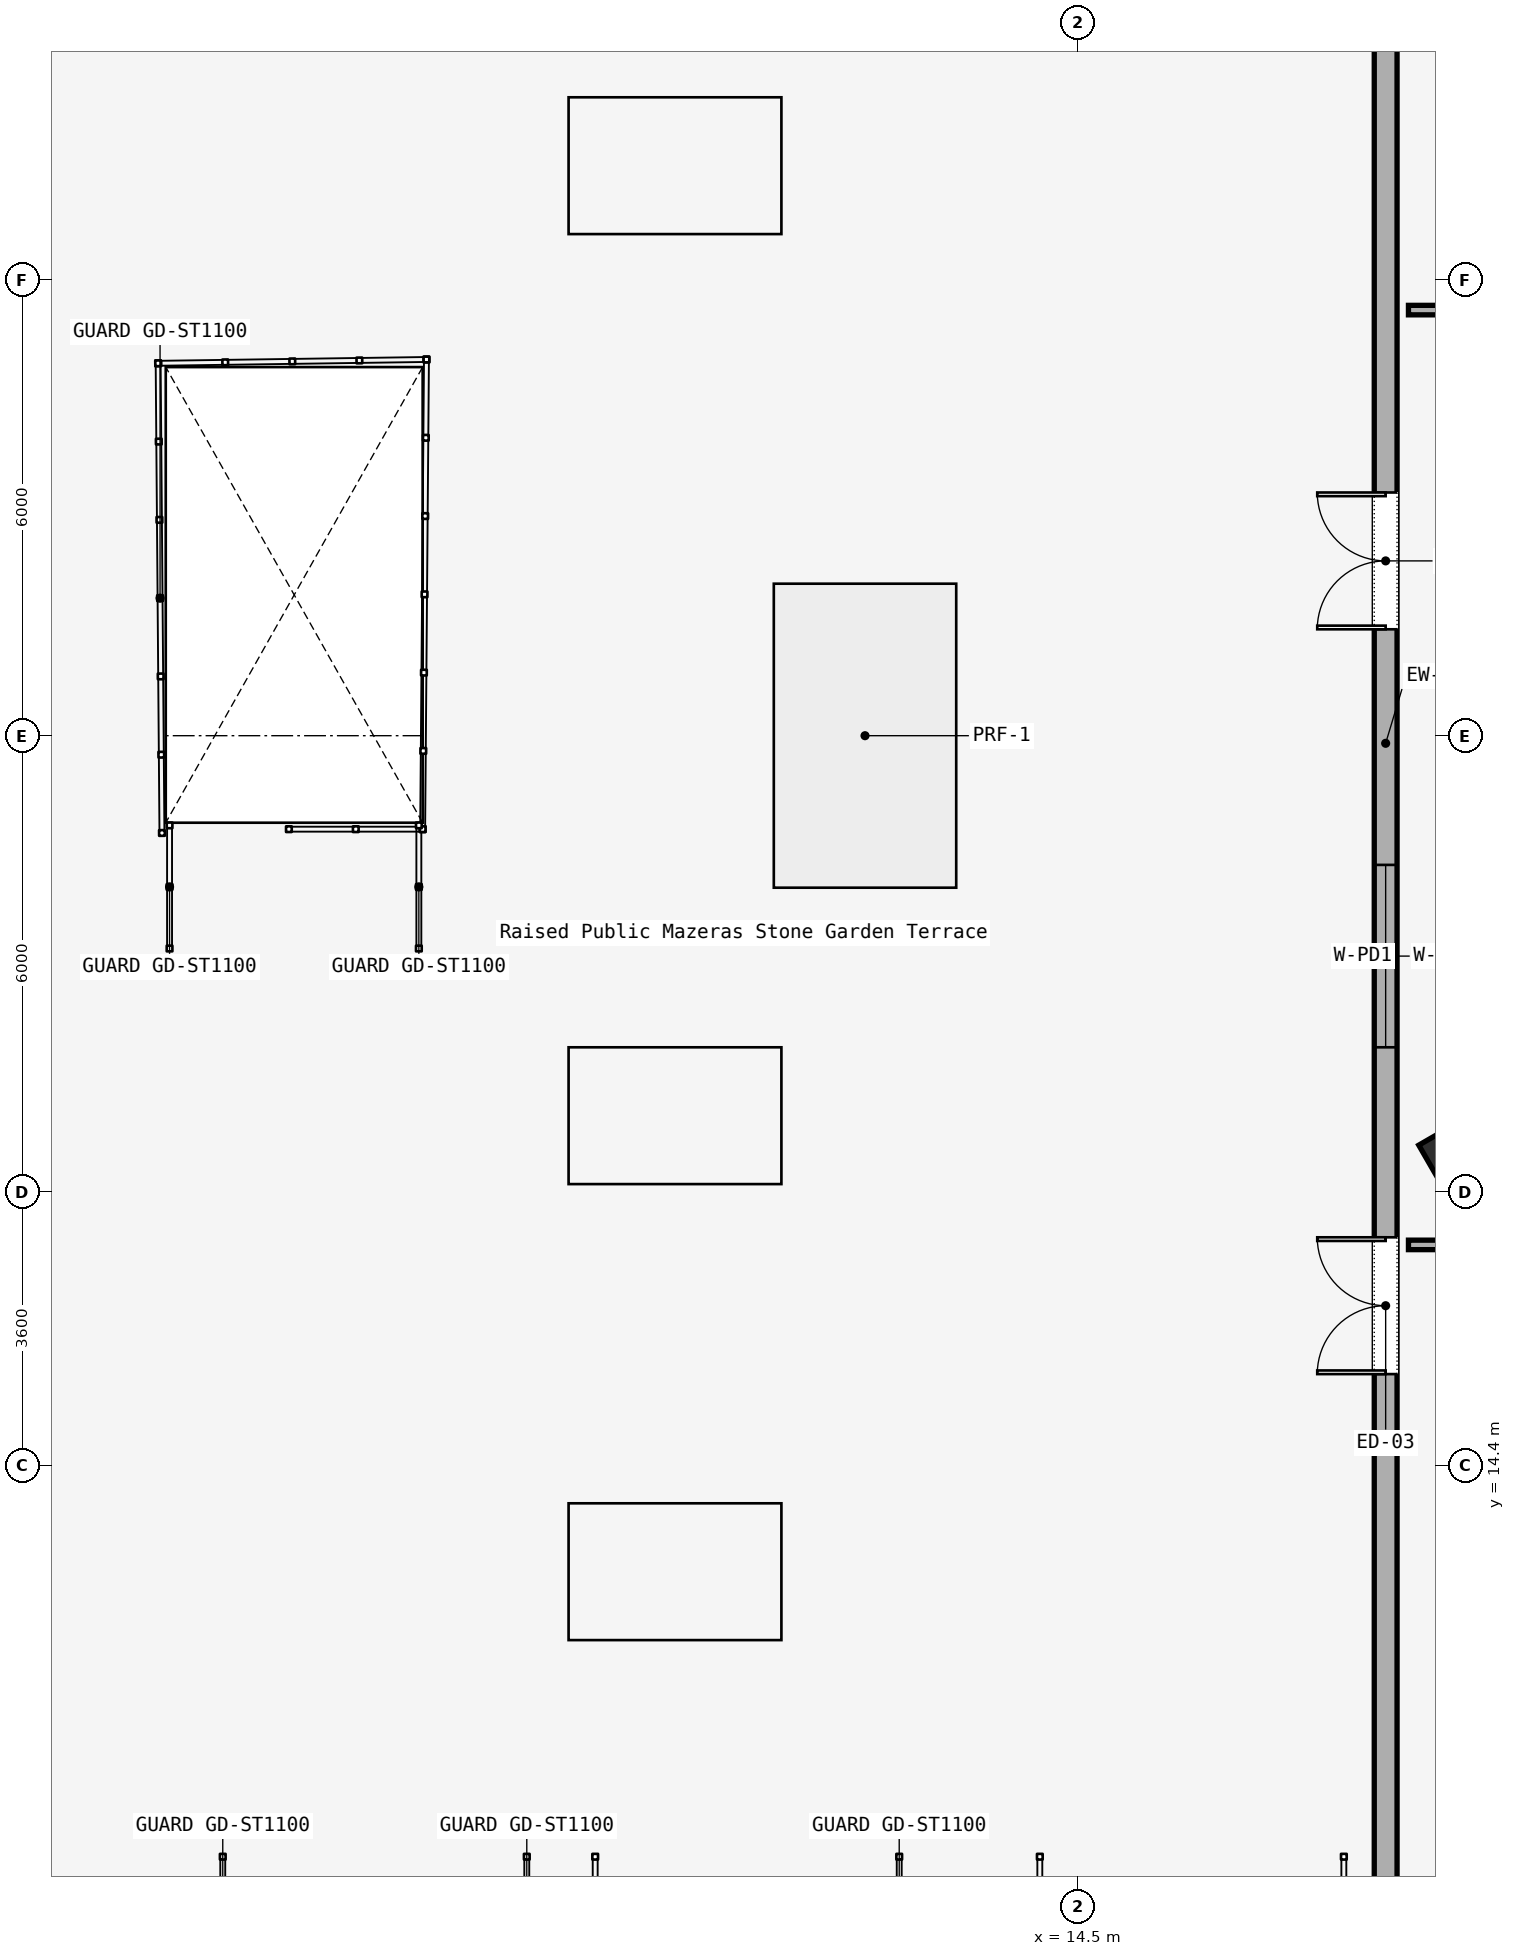
"""IFC4 building model, lengths in metres.
Left out: names, types, materials, properties, quantities, classifications, styles, units other than length and angle.
Written with IfcOpenShell. Run it as: python <this file> out.ifc"""

import sys

from ifc_helpers import new_model, si_unit, direction, frame, frame_2d, origin, origin_2d, place, context, subcontext, project, spatial, rectangle, i_section, extrude, element, fill, save


model = new_model("IFC4")
c1 = context("Model", 3, precision=1e-05, world=origin(), true_north=direction((0.0, 1.0)))
c2 = subcontext(c1, "Body", "Model", "MODEL_VIEW")
j1 = project(units=[si_unit("LENGTHUNIT", "METRE"), si_unit("PLANEANGLEUNIT", "RADIAN")], contexts=[c1])
p1 = place(None, origin())
s1 = spatial("IfcSite", under=j1, at=p1, CompositionType="ELEMENT")
p2 = place(p1, origin())
s2 = spatial("IfcBuilding", under=s1, at=p2, CompositionType="ELEMENT")
p3 = place(p2, frame((0.0, 0.0, 30.0)))
s3 = spatial("IfcBuildingStorey", under=s2, at=p3, CompositionType="ELEMENT", Elevation=30.0)
p4 = place(p3, frame((19.346, 18.558, 0.0), z_axis=(0.0, 0.0, 1.0), x_axis=(-0.5, 0.866025403784, 0.0)))
e1 = element("IfcColumn", 1, at=p4, inside=s3, PredefinedType="COLUMN", context=c2, shape_type="SweptSolid", body=[
    extrude(i_section(OverallWidth=0.454, OverallDepth=0.569, WebThickness=0.078, FlangeThickness=0.08, FilletRadius=0.015, at=origin_2d()), origin(), (0.0, 0.0, 1.0), 6.0),
])
p5 = place(p3, frame((18.55, 5.4, 0.0), z_axis=(0.0, 0.0, 1.0), x_axis=(0.0, 1.0, 0.0)))
e2 = element("IfcWall", 2, at=p5, inside=s3, PredefinedType="SOLIDWALL", context=c2, shape_type="SweptSolid", body=[
    extrude(rectangle(XDim=37.0, YDim=0.3, at=frame_2d((18.5, 0.0))), origin(), (0.0, 0.0, 1.0), 5.78),
])
p6 = place(p5, frame((10.2, 0.0, 0.0)))
e3 = element("IfcOpeningElement", 3, at=p6, cuts=e2, PredefinedType="OPENING", context=c2, shape_type="SweptSolid", body=[
    extrude(rectangle(XDim=1.8, YDim=2.4, at=frame_2d((0.9, 1.2))), frame((0.0, 0.15, 0.0), z_axis=(0.0, -1.0, 0.0), x_axis=(1.0, 0.0, 0.0)), (0.0, 0.0, 1.0), 0.3),
])
p7 = place(p5, frame((20.0, 0.0, 0.0)))
e4 = element("IfcOpeningElement", 4, at=p7, cuts=e2, PredefinedType="OPENING", context=c2, shape_type="SweptSolid", body=[
    extrude(rectangle(XDim=1.8, YDim=2.4, at=frame_2d((0.9, 1.2))), frame((0.0, 0.15, 0.0), z_axis=(0.0, -1.0, 0.0), x_axis=(1.0, 0.0, 0.0)), (0.0, 0.0, 1.0), 0.3),
])
p8 = place(p5, frame((14.5, 0.0, 0.9)))
e5 = element("IfcOpeningElement", 5, at=p8, cuts=e2, PredefinedType="OPENING", context=c2, shape_type="SweptSolid", body=[
    extrude(rectangle(XDim=2.4, YDim=2.2, at=frame_2d((1.2, 1.1))), frame((0.0, 0.15, 0.0), z_axis=(0.0, -1.0, 0.0), x_axis=(1.0, 0.0, 0.0)), (0.0, 0.0, 1.0), 0.3),
])
p9 = place(p5, frame((28.0, 0.0, 0.9)))
e6 = element("IfcOpeningElement", 6, at=p9, cuts=e2, PredefinedType="OPENING", context=c2, shape_type="SweptSolid", body=[
    extrude(rectangle(XDim=2.4, YDim=2.2, at=frame_2d((1.2, 1.1))), frame((0.0, 0.15, 0.0), z_axis=(0.0, -1.0, 0.0), x_axis=(1.0, 0.0, 0.0)), (0.0, 0.0, 1.0), 0.3),
])
p10 = place(p3, frame((22.135, 17.3, 0.0), z_axis=(0.0, 0.0, 1.0), x_axis=(-1.0, 0.0, 0.0)))
e7 = element("IfcWall", 7, at=p10, inside=s3, PredefinedType="PARTITIONING", context=c2, shape_type="SweptSolid", body=[
    extrude(rectangle(XDim=3.285, YDim=0.125, at=frame_2d((1.643, 0.0))), origin(), (0.0, 0.0, 1.0), 5.133),
])
p11 = place(p3, frame((18.85, 29.6, 0.0), z_axis=(0.0, 0.0, 1.0), x_axis=(1.0, 0.0, 0.0)))
e8 = element("IfcWall", 8, at=p11, inside=s3, PredefinedType="PARTITIONING", context=c2, shape_type="SweptSolid", body=[
    extrude(rectangle(XDim=22.085, YDim=0.125, at=frame_2d((11.042, 0.0))), origin(), (0.0, 0.0, 1.0), 5.133),
])
p12 = place(p6, origin())
e9 = element("IfcDoor", 9, at=p12, inside=s3, OperationType="DOUBLE_DOOR_SINGLE_SWING", PredefinedType="DOOR", context=c2, shape_type="SweptSolid", body=[
    extrude(rectangle(XDim=1.8, YDim=2.4, at=frame_2d((0.9, 1.2))), frame((0.0, 0.025, 0.0), z_axis=(0.0, -1.0, 0.0), x_axis=(1.0, 0.0, 0.0)), (0.0, 0.0, 1.0), 0.05),
])
fill(e3, e9)
p13 = place(p7, origin())
e10 = element("IfcDoor", 10, at=p13, inside=s3, OperationType="DOUBLE_DOOR_SINGLE_SWING", PredefinedType="DOOR", context=c2, shape_type="SweptSolid", body=[
    extrude(rectangle(XDim=1.8, YDim=2.4, at=frame_2d((0.9, 1.2))), frame((0.0, 0.025, 0.0), z_axis=(0.0, -1.0, 0.0), x_axis=(1.0, 0.0, 0.0)), (0.0, 0.0, 1.0), 0.05),
])
fill(e4, e10)
p14 = place(p8, origin())
e11 = element("IfcWindow", 11, at=p14, inside=s3, PartitioningType="SINGLE_PANEL", PredefinedType="WINDOW", context=c2, shape_type="SweptSolid", body=[
    extrude(rectangle(XDim=2.4, YDim=2.2, at=frame_2d((1.2, 1.1))), frame((0.0, 0.03, 0.0), z_axis=(0.0, -1.0, 0.0), x_axis=(1.0, 0.0, 0.0)), (0.0, 0.0, 1.0), 0.06),
])
fill(e5, e11)
save(model, sys.argv[1])
